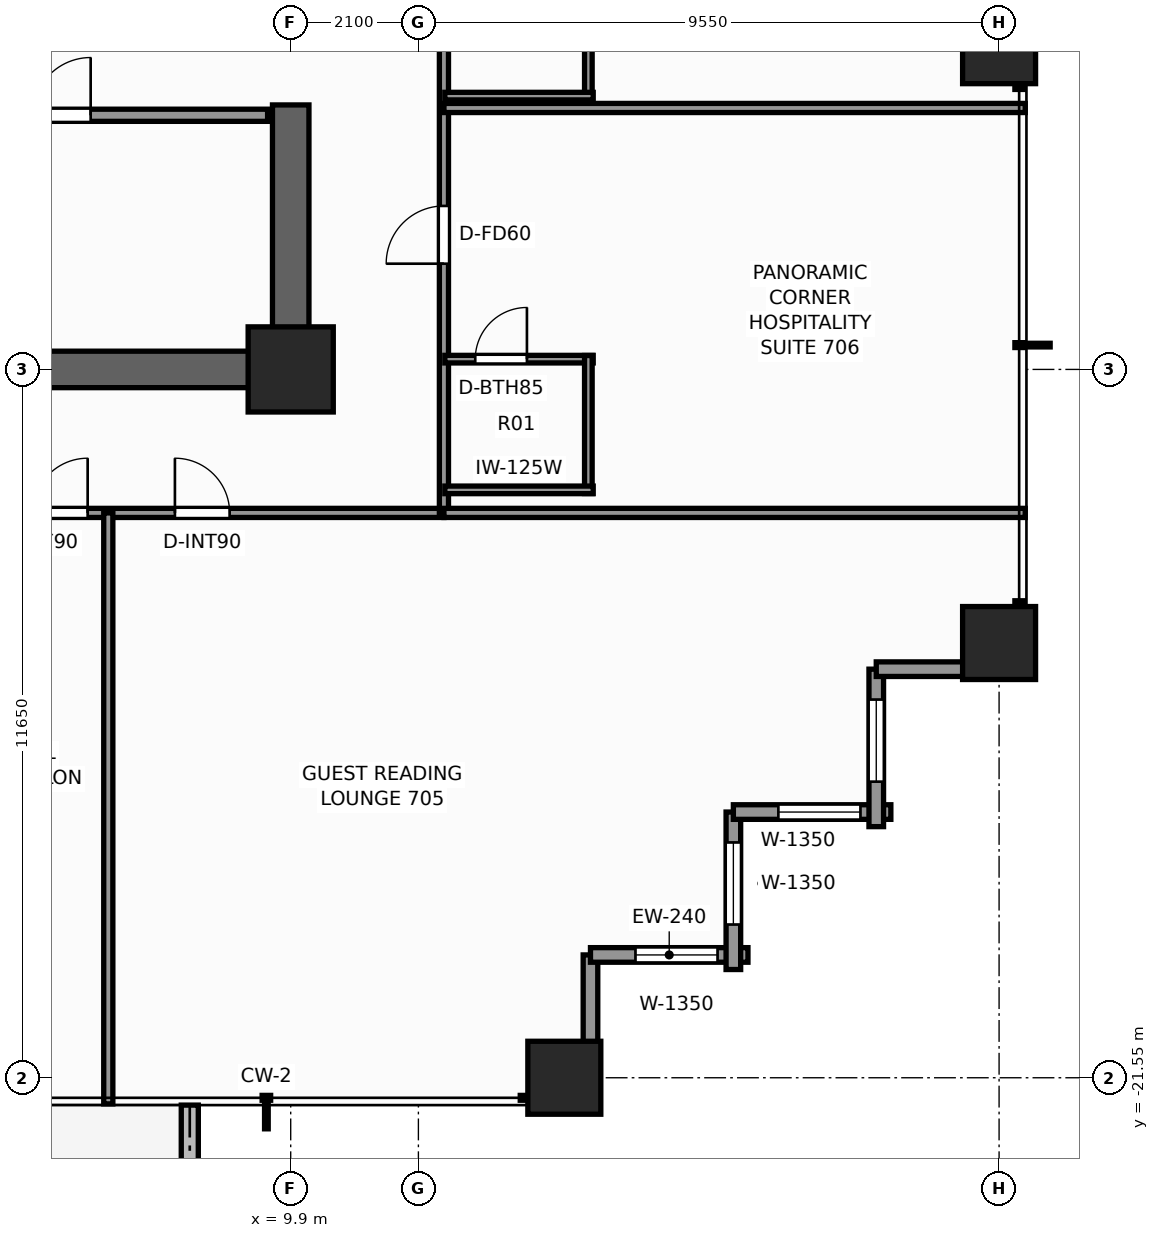
"""IFC4 building model, lengths in metres.
Left out: names, types, materials, properties, quantities, classifications, styles, units other than length and angle.
Written with IfcOpenShell. Run it as: python <this file> out.ifc"""

import sys

from ifc_helpers import new_model, si_unit, direction, frame, frame_2d, origin, origin_2d, place, context, subcontext, project, spatial, rectangle, extrude, element, fill, save


model = new_model("IFC4")
c1 = context("Model", 3, precision=1e-05, world=origin(), true_north=direction((0.0, 1.0)))
c2 = subcontext(c1, "Body", "Model", "MODEL_VIEW")
j1 = project(units=[si_unit("LENGTHUNIT", "METRE"), si_unit("PLANEANGLEUNIT", "RADIAN")], contexts=[c1])
p1 = place(None, origin())
s1 = spatial("IfcSite", under=j1, at=p1, CompositionType="ELEMENT")
p2 = place(p1, origin())
s2 = spatial("IfcBuilding", under=s1, at=p2, CompositionType="ELEMENT")
p3 = place(p2, frame((0.0, 0.0, 27.1)))
s3 = spatial("IfcBuildingStorey", under=s2, at=p3, CompositionType="ELEMENT", Elevation=27.1)
p4 = place(p3, frame((10.2, -9.9, 0.0), z_axis=(0.0, 0.0, 1.0), x_axis=(-1.0, 0.0, 0.0)))
e1 = element("IfcWall", 1, at=p4, inside=s3, PredefinedType="SHEAR", context=c2, shape_type="SweptSolid", body=[
    extrude(rectangle(XDim=12.06, YDim=0.6, at=frame_2d((6.03, 0.0))), origin(), (0.0, 0.0, 1.0), 3.3),
])
p5 = place(p3, frame((9.9, -9.6, 0.0), z_axis=(0.0, 0.0, 1.0), x_axis=(0.0, 1.0, 0.0)))
e2 = element("IfcWall", 2, at=p5, inside=s3, PredefinedType="SHEAR", context=c2, shape_type="SweptSolid", body=[
    extrude(rectangle(XDim=4.05, YDim=0.6, at=frame_2d((2.025, 0.0))), origin(), (0.0, 0.0, 1.0), 3.3),
])
p6 = place(p3, frame((9.9, -9.9, 0.0), z_axis=(0.0, 0.0, 1.0), x_axis=(1.0, 0.0, 0.0)))
e3 = element("IfcColumn", 3, at=p6, inside=s3, PredefinedType="COLUMN", context=c2, shape_type="SweptSolid", body=[
    extrude(rectangle(XDim=1.4, YDim=1.4, at=origin_2d()), origin(), (0.0, 0.0, 1.0), 3.3),
])
for number, where, z_axis, x_axis in (
    (4, (14.4, -21.55, 0.0), (0.0, 0.0, 1.0), (1.0, 0.0, 0.0)),
    (5, (21.55, -14.4, 0.0), (0.0, 0.0, 1.0), (1.0, 0.0, 0.0)),
    (6, (21.55, -4.6, 0.0), (0.0, 0.0, 1.0), (1.0, 0.0, 0.0)),
):
    element("IfcColumn", number, at=place(p3, frame(where, z_axis=z_axis, x_axis=x_axis)), inside=s3, PredefinedType="COLUMN", context=c2, shape_type="SweptSolid", body=[
        extrude(rectangle(XDim=1.2, YDim=1.2, at=origin_2d()), origin(), (0.0, 0.0, 1.0), 3.3),
    ])
p7 = place(p3, frame((8.24, -25.42, -0.06), z_axis=(0.0, 0.0, 1.0), x_axis=(0.0, 1.0, 0.0)))
e7 = element("IfcWall", 7, at=p7, inside=s3, PredefinedType="PARAPET", context=c2, shape_type="SweptSolid", body=[
    extrude(rectangle(XDim=3.42, YDim=0.28, at=frame_2d((1.71, 0.0))), origin(), (0.0, 0.0, 1.0), 0.42),
])
p8 = place(p3, frame((14.83, -19.53, 0.0), z_axis=(0.0, 0.0, 1.0), x_axis=(0.0, -1.0, 0.0)))
e8 = element("IfcWall", 8, at=p8, inside=s3, PredefinedType="STANDARD", context=c2, shape_type="SweptSolid", body=[
    extrude(rectangle(XDim=2.59, YDim=0.24, at=frame_2d((1.295, 0.0))), origin(), (0.0, 0.0, 1.0), 2.439),
])
p9 = place(p3, frame((17.42, -19.53, 0.0), z_axis=(0.0, 0.0, 1.0), x_axis=(-1.0, 0.0, 0.0)))
e9 = element("IfcWall", 9, at=p9, inside=s3, PredefinedType="STANDARD", context=c2, shape_type="SweptSolid", body=[
    extrude(rectangle(XDim=2.59, YDim=0.24, at=frame_2d((1.295, 0.0))), origin(), (0.0, 0.0, 1.0), 2.439),
])
p10 = place(p9, frame((0.5, 0.0, 0.65)))
e10 = element("IfcOpeningElement", 10, at=p10, cuts=e9, PredefinedType="OPENING", context=c2, shape_type="SweptSolid", body=[
    extrude(rectangle(XDim=1.35, YDim=1.55, at=frame_2d((0.675, 0.775))), frame((0.0, 0.13, 0.0), z_axis=(0.0, -1.0, 0.0), x_axis=(1.0, 0.0, 0.0)), (0.0, 0.0, 1.0), 0.26),
])
p11 = place(p3, frame((17.18, -17.18, 0.0), z_axis=(0.0, 0.0, 1.0), x_axis=(0.0, -1.0, 0.0)))
e11 = element("IfcWall", 11, at=p11, inside=s3, PredefinedType="STANDARD", context=c2, shape_type="SweptSolid", body=[
    extrude(rectangle(XDim=2.59, YDim=0.24, at=frame_2d((1.295, 0.0))), origin(), (0.0, 0.0, 1.0), 2.439),
])
p12 = place(p11, frame((0.5, 0.0, 0.65)))
e12 = element("IfcOpeningElement", 12, at=p12, cuts=e11, PredefinedType="OPENING", context=c2, shape_type="SweptSolid", body=[
    extrude(rectangle(XDim=1.35, YDim=1.55, at=frame_2d((0.675, 0.775))), frame((0.0, 0.13, 0.0), z_axis=(0.0, -1.0, 0.0), x_axis=(1.0, 0.0, 0.0)), (0.0, 0.0, 1.0), 0.26),
])
p13 = place(p3, frame((19.77, -17.18, 0.0), z_axis=(0.0, 0.0, 1.0), x_axis=(-1.0, 0.0, 0.0)))
e13 = element("IfcWall", 13, at=p13, inside=s3, PredefinedType="STANDARD", context=c2, shape_type="SweptSolid", body=[
    extrude(rectangle(XDim=2.59, YDim=0.24, at=frame_2d((1.295, 0.0))), origin(), (0.0, 0.0, 1.0), 2.439),
])
p14 = place(p13, frame((0.5, 0.0, 0.65)))
e14 = element("IfcOpeningElement", 14, at=p14, cuts=e13, PredefinedType="OPENING", context=c2, shape_type="SweptSolid", body=[
    extrude(rectangle(XDim=1.35, YDim=1.55, at=frame_2d((0.675, 0.775))), frame((0.0, 0.13, 0.0), z_axis=(0.0, -1.0, 0.0), x_axis=(1.0, 0.0, 0.0)), (0.0, 0.0, 1.0), 0.26),
])
p15 = place(p3, frame((19.53, -14.83, 0.0), z_axis=(0.0, 0.0, 1.0), x_axis=(0.0, -1.0, 0.0)))
e15 = element("IfcWall", 15, at=p15, inside=s3, PredefinedType="STANDARD", context=c2, shape_type="SweptSolid", body=[
    extrude(rectangle(XDim=2.59, YDim=0.24, at=frame_2d((1.295, 0.0))), origin(), (0.0, 0.0, 1.0), 2.439),
])
p16 = place(p15, frame((0.5, 0.0, 0.65)))
e16 = element("IfcOpeningElement", 16, at=p16, cuts=e15, PredefinedType="OPENING", context=c2, shape_type="SweptSolid", body=[
    extrude(rectangle(XDim=1.35, YDim=1.55, at=frame_2d((0.675, 0.775))), frame((0.0, 0.13, 0.0), z_axis=(0.0, -1.0, 0.0), x_axis=(1.0, 0.0, 0.0)), (0.0, 0.0, 1.0), 0.26),
])
p17 = place(p3, frame((22.12, -14.83, 0.0), z_axis=(0.0, 0.0, 1.0), x_axis=(-1.0, 0.0, 0.0)))
e17 = element("IfcWall", 17, at=p17, inside=s3, PredefinedType="STANDARD", context=c2, shape_type="SweptSolid", body=[
    extrude(rectangle(XDim=2.59, YDim=0.24, at=frame_2d((1.295, 0.0))), origin(), (0.0, 0.0, 1.0), 2.439),
])
p18 = place(p3, frame((3.86, -5.72, 0.0), z_axis=(0.0, 0.0, 1.0), x_axis=(1.0, 0.0, 0.0)))
e18 = element("IfcWall", 18, at=p18, inside=s3, PredefinedType="SOLIDWALL", context=c2, shape_type="SweptSolid", body=[
    extrude(rectangle(XDim=5.66, YDim=0.2, at=frame_2d((2.83, 0.0))), origin(), (0.0, 0.0, 1.0), 3.06),
])
p19 = place(p18, frame((1.8, 0.0, 0.0)))
e19 = element("IfcOpeningElement", 19, at=p19, cuts=e18, PredefinedType="OPENING", context=c2, shape_type="SweptSolid", body=[
    extrude(rectangle(XDim=0.95, YDim=2.06, at=frame_2d((0.475, 1.03))), frame((0.0, 0.11, 0.0), z_axis=(0.0, -1.0, 0.0), x_axis=(1.0, 0.0, 0.0)), (0.0, 0.0, 1.0), 0.22),
])
p20 = place(p3, frame((-12.26, -12.26, 0.0), z_axis=(0.0, 0.0, 1.0), x_axis=(1.0, 0.0, 0.0)))
e20 = element("IfcWall", 20, at=p20, inside=s3, PredefinedType="PARTITIONING", context=c2, shape_type="SweptSolid", body=[
    extrude(rectangle(XDim=24.68, YDim=0.15, at=frame_2d((12.34, 0.0))), origin(), (0.0, 0.0, 1.0), 2.272),
])
p21 = place(p20, frame((3.444, 0.0, 0.0)))
e21 = element("IfcOpeningElement", 21, at=p21, cuts=e20, PredefinedType="OPENING", context=c2, shape_type="SweptSolid", body=[
    extrude(rectangle(XDim=0.9, YDim=2.06, at=frame_2d((0.45, 1.03))), frame((0.0, 0.085, 0.0), z_axis=(0.0, -1.0, 0.0), x_axis=(1.0, 0.0, 0.0)), (0.0, 0.0, 1.0), 0.17),
])
p22 = place(p20, frame((5.779, 0.0, 0.0)))
e22 = element("IfcOpeningElement", 22, at=p22, cuts=e20, PredefinedType="OPENING", context=c2, shape_type="SweptSolid", body=[
    extrude(rectangle(XDim=0.9, YDim=2.06, at=frame_2d((0.45, 1.03))), frame((0.0, 0.085, 0.0), z_axis=(0.0, -1.0, 0.0), x_axis=(1.0, 0.0, 0.0)), (0.0, 0.0, 1.0), 0.17),
])
p23 = place(p20, frame((13.551, 0.0, 0.0)))
e23 = element("IfcOpeningElement", 23, at=p23, cuts=e20, PredefinedType="OPENING", context=c2, shape_type="SweptSolid", body=[
    extrude(rectangle(XDim=0.9, YDim=2.06, at=frame_2d((0.45, 1.03))), frame((0.0, 0.085, 0.0), z_axis=(0.0, -1.0, 0.0), x_axis=(1.0, 0.0, 0.0)), (0.0, 0.0, 1.0), 0.17),
])
p24 = place(p20, frame((17.921, 0.0, 0.0)))
e24 = element("IfcOpeningElement", 24, at=p24, cuts=e20, PredefinedType="OPENING", context=c2, shape_type="SweptSolid", body=[
    extrude(rectangle(XDim=0.9, YDim=2.06, at=frame_2d((0.45, 1.03))), frame((0.0, 0.085, 0.0), z_axis=(0.0, -1.0, 0.0), x_axis=(1.0, 0.0, 0.0)), (0.0, 0.0, 1.0), 0.17),
])
p25 = place(p20, frame((20.256, 0.0, 0.0)))
e25 = element("IfcOpeningElement", 25, at=p25, cuts=e20, PredefinedType="OPENING", context=c2, shape_type="SweptSolid", body=[
    extrude(rectangle(XDim=0.9, YDim=2.06, at=frame_2d((0.45, 1.03))), frame((0.0, 0.085, 0.0), z_axis=(0.0, -1.0, 0.0), x_axis=(1.0, 0.0, 0.0)), (0.0, 0.0, 1.0), 0.17),
])
p26 = place(p3, frame((12.42, -12.26, 0.0), z_axis=(0.0, 0.0, 1.0), x_axis=(0.0, 1.0, 0.0)))
e26 = element("IfcWall", 26, at=p26, inside=s3, PredefinedType="PARTITIONING", context=c2, shape_type="SweptSolid", body=[
    extrude(rectangle(XDim=24.84, YDim=0.15, at=frame_2d((12.42, 0.0))), origin(), (0.0, 0.0, 1.0), 2.272),
])
p27 = place(p26, frame((4.099, 0.0, 0.0)))
e27 = element("IfcOpeningElement", 27, at=p27, cuts=e26, PredefinedType="OPENING", context=c2, shape_type="SweptSolid", body=[
    extrude(rectangle(XDim=0.95, YDim=2.06, at=frame_2d((0.475, 1.03))), frame((0.0, 0.085, 0.0), z_axis=(0.0, -1.0, 0.0), x_axis=(1.0, 0.0, 0.0)), (0.0, 0.0, 1.0), 0.17),
])
p28 = place(p26, frame((13.577, 0.0, 0.0)))
e28 = element("IfcOpeningElement", 28, at=p28, cuts=e26, PredefinedType="OPENING", context=c2, shape_type="SweptSolid", body=[
    extrude(rectangle(XDim=0.95, YDim=2.06, at=frame_2d((0.475, 1.03))), frame((0.0, 0.085, 0.0), z_axis=(0.0, -1.0, 0.0), x_axis=(1.0, 0.0, 0.0)), (0.0, 0.0, 1.0), 0.17),
])
p29 = place(p26, frame((19.692, 0.0, 0.0)))
e29 = element("IfcOpeningElement", 29, at=p29, cuts=e26, PredefinedType="OPENING", context=c2, shape_type="SweptSolid", body=[
    extrude(rectangle(XDim=0.95, YDim=2.06, at=frame_2d((0.475, 1.03))), frame((0.0, 0.085, 0.0), z_axis=(0.0, -1.0, 0.0), x_axis=(1.0, 0.0, 0.0)), (0.0, 0.0, 1.0), 0.17),
])
p30 = place(p3, frame((12.42, -12.26, 0.0), z_axis=(0.0, 0.0, 1.0), x_axis=(1.0, 0.0, 0.0)))
e30 = element("IfcWall", 30, at=p30, inside=s3, PredefinedType="PARTITIONING", context=c2, shape_type="SweptSolid", body=[
    extrude(rectangle(XDim=9.56, YDim=0.15, at=frame_2d((4.78, 0.0))), origin(), (0.0, 0.0, 1.0), 2.272),
])
p31 = place(p3, frame((6.9, -21.98, 0.0), z_axis=(0.0, 0.0, 1.0), x_axis=(0.0, 1.0, 0.0)))
e31 = element("IfcWall", 31, at=p31, inside=s3, PredefinedType="PARTITIONING", context=c2, shape_type="SweptSolid", body=[
    extrude(rectangle(XDim=9.72, YDim=0.15, at=frame_2d((4.86, 0.0))), origin(), (0.0, 0.0, 1.0), 2.429),
])
p32 = place(p3, frame((12.42, -5.6, 0.0), z_axis=(0.0, 0.0, 1.0), x_axis=(1.0, 0.0, 0.0)))
e32 = element("IfcWall", 32, at=p32, inside=s3, PredefinedType="PARTITIONING", context=c2, shape_type="SweptSolid", body=[
    extrude(rectangle(XDim=9.56, YDim=0.15, at=frame_2d((4.78, 0.0))), origin(), (0.0, 0.0, 1.0), 2.429),
])
p33 = place(p3, frame((12.435, -9.731, 0.0), z_axis=(0.0, 0.0, 1.0), x_axis=(1.0, 0.0, 0.0)))
e33 = element("IfcWall", 33, at=p33, inside=s3, PredefinedType="PARTITIONING", context=c2, shape_type="SweptSolid", body=[
    extrude(rectangle(XDim=2.44, YDim=0.125, at=frame_2d((1.22, 0.0))), origin(), (0.0, 0.0, 1.0), 3.06),
])
p34 = place(p33, frame((0.5, 0.0, 0.0)))
e34 = element("IfcOpeningElement", 34, at=p34, cuts=e33, PredefinedType="OPENING", context=c2, shape_type="SweptSolid", body=[
    extrude(rectangle(XDim=0.85, YDim=2.03, at=frame_2d((0.425, 1.015))), frame((0.0, 0.073, 0.0), z_axis=(0.0, -1.0, 0.0), x_axis=(1.0, 0.0, 0.0)), (0.0, 0.0, 1.0), 0.145),
])
p35 = place(p3, frame((14.795, -11.941, 0.0), z_axis=(0.0, 0.0, 1.0), x_axis=(0.0, 1.0, 0.0)))
e35 = element("IfcWall", 35, at=p35, inside=s3, PredefinedType="PARTITIONING", context=c2, shape_type="SweptSolid", body=[
    extrude(rectangle(XDim=2.27, YDim=0.125, at=frame_2d((1.135, 0.0))), origin(), (0.0, 0.0, 1.0), 2.272),
])
p36 = place(p3, frame((12.435, -11.881, 0.0), z_axis=(0.0, 0.0, 1.0), x_axis=(1.0, 0.0, 0.0)))
e36 = element("IfcWall", 36, at=p36, inside=s3, PredefinedType="PARTITIONING", context=c2, shape_type="SweptSolid", body=[
    extrude(rectangle(XDim=2.44, YDim=0.125, at=frame_2d((1.22, 0.0))), origin(), (0.0, 0.0, 1.0), 2.272),
])
p37 = place(p3, frame((14.795, -5.465, 0.0), z_axis=(0.0, 0.0, 1.0), x_axis=(0.0, 1.0, 0.0)))
e37 = element("IfcWall", 37, at=p37, inside=s3, PredefinedType="PARTITIONING", context=c2, shape_type="SweptSolid", body=[
    extrude(rectangle(XDim=2.27, YDim=0.125, at=frame_2d((1.135, 0.0))), origin(), (0.0, 0.0, 1.0), 2.272),
])
p38 = place(p3, frame((12.435, -5.405, 0.0), z_axis=(0.0, 0.0, 1.0), x_axis=(1.0, 0.0, 0.0)))
e38 = element("IfcWall", 38, at=p38, inside=s3, PredefinedType="PARTITIONING", context=c2, shape_type="SweptSolid", body=[
    extrude(rectangle(XDim=2.44, YDim=0.125, at=frame_2d((1.22, 0.0))), origin(), (0.0, 0.0, 1.0), 3.06),
])
p39 = place(p10, origin())
e39 = element("IfcWindow", 39, at=p39, inside=s3, PartitioningType="SINGLE_PANEL", PredefinedType="WINDOW", context=c2, shape_type="SweptSolid", body=[
    extrude(rectangle(XDim=1.35, YDim=1.55, at=frame_2d((0.675, 0.775))), frame((0.0, 0.03, 0.0), z_axis=(0.0, -1.0, 0.0), x_axis=(1.0, 0.0, 0.0)), (0.0, 0.0, 1.0), 0.06),
])
fill(e10, e39)
p40 = place(p12, origin())
e40 = element("IfcWindow", 40, at=p40, inside=s3, PartitioningType="SINGLE_PANEL", PredefinedType="WINDOW", context=c2, shape_type="SweptSolid", body=[
    extrude(rectangle(XDim=1.35, YDim=1.55, at=frame_2d((0.675, 0.775))), frame((0.0, 0.03, 0.0), z_axis=(0.0, -1.0, 0.0), x_axis=(1.0, 0.0, 0.0)), (0.0, 0.0, 1.0), 0.06),
])
fill(e12, e40)
p41 = place(p14, origin())
e41 = element("IfcWindow", 41, at=p41, inside=s3, PartitioningType="SINGLE_PANEL", PredefinedType="WINDOW", context=c2, shape_type="SweptSolid", body=[
    extrude(rectangle(XDim=1.35, YDim=1.55, at=frame_2d((0.675, 0.775))), frame((0.0, 0.03, 0.0), z_axis=(0.0, -1.0, 0.0), x_axis=(1.0, 0.0, 0.0)), (0.0, 0.0, 1.0), 0.06),
])
fill(e14, e41)
p42 = place(p16, origin())
e42 = element("IfcWindow", 42, at=p42, inside=s3, PartitioningType="SINGLE_PANEL", PredefinedType="WINDOW", context=c2, shape_type="SweptSolid", body=[
    extrude(rectangle(XDim=1.35, YDim=1.55, at=frame_2d((0.675, 0.775))), frame((0.0, 0.03, 0.0), z_axis=(0.0, -1.0, 0.0), x_axis=(1.0, 0.0, 0.0)), (0.0, 0.0, 1.0), 0.06),
])
fill(e16, e42)
p43 = place(p19, origin())
e43 = element("IfcDoor", 43, at=p43, inside=s3, OperationType="SINGLE_SWING_RIGHT", PredefinedType="DOOR", context=c2, shape_type="SweptSolid", body=[
    extrude(rectangle(XDim=0.95, YDim=2.06, at=frame_2d((0.475, 1.03))), frame((0.0, 0.025, 0.0), z_axis=(0.0, -1.0, 0.0), x_axis=(1.0, 0.0, 0.0)), (0.0, 0.0, 1.0), 0.05),
])
fill(e19, e43)
p44 = place(p24, origin())
e44 = element("IfcDoor", 44, at=p44, inside=s3, OperationType="SINGLE_SWING_RIGHT", PredefinedType="DOOR", context=c2, shape_type="SweptSolid", body=[
    extrude(rectangle(XDim=0.9, YDim=2.06, at=frame_2d((0.45, 1.03))), frame((0.0, 0.025, 0.0), z_axis=(0.0, -1.0, 0.0), x_axis=(1.0, 0.0, 0.0)), (0.0, 0.0, 1.0), 0.05),
])
fill(e24, e44)
p45 = place(p25, origin())
e45 = element("IfcDoor", 45, at=p45, inside=s3, OperationType="SINGLE_SWING_LEFT", PredefinedType="DOOR", context=c2, shape_type="SweptSolid", body=[
    extrude(rectangle(XDim=0.9, YDim=2.06, at=frame_2d((0.45, 1.03))), frame((0.0, 0.025, 0.0), z_axis=(0.0, -1.0, 0.0), x_axis=(1.0, 0.0, 0.0)), (0.0, 0.0, 1.0), 0.05),
])
fill(e25, e45)
p46 = place(p34, origin())
e46 = element("IfcDoor", 46, at=p46, inside=s3, OperationType="SINGLE_SWING_RIGHT", PredefinedType="DOOR", context=c2, shape_type="SweptSolid", body=[
    extrude(rectangle(XDim=0.85, YDim=2.03, at=frame_2d((0.425, 1.015))), frame((0.0, 0.025, 0.0), z_axis=(0.0, -1.0, 0.0), x_axis=(1.0, 0.0, 0.0)), (0.0, 0.0, 1.0), 0.05),
])
fill(e34, e46)
p47 = place(p27, origin())
e47 = element("IfcDoor", 47, at=p47, inside=s3, OperationType="SINGLE_SWING_LEFT", PredefinedType="DOOR", context=c2, shape_type="SweptSolid", body=[
    extrude(rectangle(XDim=0.95, YDim=2.06, at=frame_2d((0.475, 1.03))), frame((0.0, 0.025, 0.0), z_axis=(0.0, -1.0, 0.0), x_axis=(1.0, 0.0, 0.0)), (0.0, 0.0, 1.0), 0.05),
])
fill(e27, e47)
save(model, sys.argv[1])
